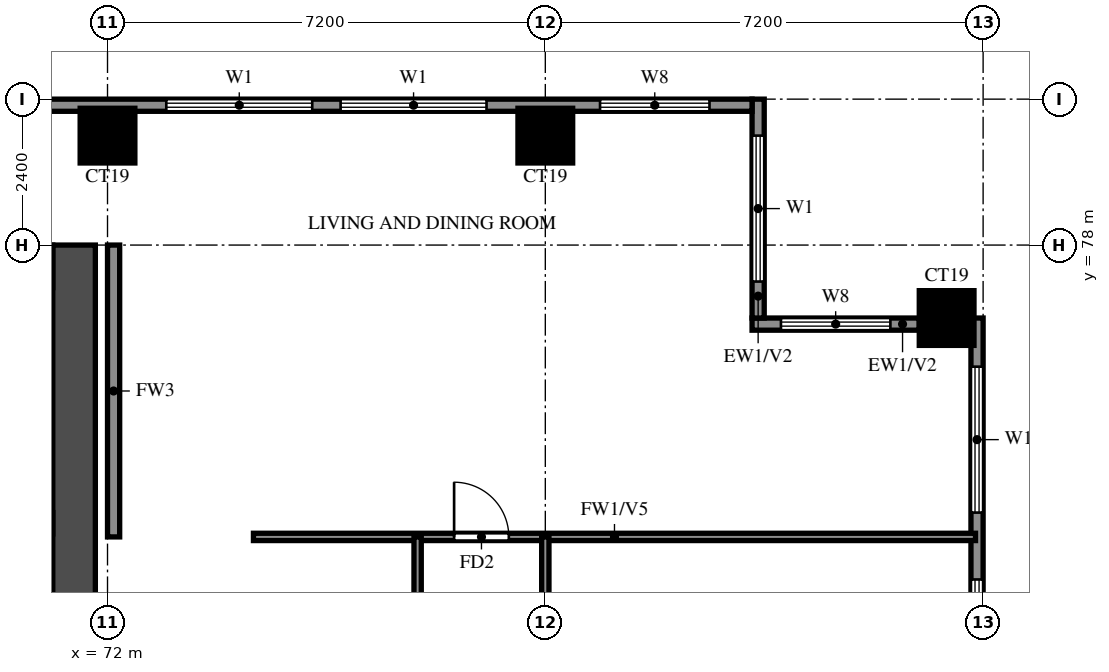
"""IFC4 building model, lengths in metres.
Left out: names, types, materials, properties, quantities, classifications, styles, units other than length and angle.
Written with IfcOpenShell. Run it as: python <this file> out.ifc"""

import sys

from ifc_helpers import new_model, si_unit, direction, frame, frame_2d, origin, origin_2d, place, context, subcontext, project, spatial, rectangle, extrude, source, transform, mapped, element, fill, save


model = new_model("IFC4")
c1 = context("Model", 3, precision=1e-05, world=origin(), true_north=direction((0.0, 1.0)))
c2 = subcontext(c1, "Body", "Model", "MODEL_VIEW")
j1 = project(units=[si_unit("LENGTHUNIT", "METRE"), si_unit("PLANEANGLEUNIT", "RADIAN")], contexts=[c1])
p1 = place(None, origin())
s1 = spatial("IfcSite", under=j1, at=p1, CompositionType="ELEMENT")
p2 = place(p1, origin())
s2 = spatial("IfcBuilding", under=s1, at=p2, CompositionType="ELEMENT")
p3 = place(p2, frame((0.0, 0.0, 130.5)))
s3 = spatial("IfcBuildingStorey", under=s2, at=p3, CompositionType="ELEMENT", Elevation=130.5)
m1 = source(origin(), c2, "Body", "SweptSolid", [
    extrude(rectangle(XDim=0.9, YDim=0.9, at=origin_2d()), origin(), (0.0, 0.0, 1.0), 3.2),
])
for number, where, z_axis, x_axis in (
    (1, (85.8, 76.8, 0.0), (0.0, 0.0, 1.0), (1.0, 0.0, 0.0)),
    (2, (72.0, 79.8, 0.0), (0.0, 0.0, 1.0), (1.0, 0.0, 0.0)),
    (3, (79.2, 79.8, 0.0), (0.0, 0.0, 1.0), (1.0, 0.0, 0.0)),
):
    element("IfcColumn", number, at=place(p3, frame(where, z_axis=z_axis, x_axis=x_axis)), inside=s3, PredefinedType="COLUMN", context=c2, shape_type="MappedRepresentation", body=[
        mapped(m1, transform((0.0, 0.0, 0.0))),
    ])
p4 = place(p3, frame((71.45, 66.1, 0.0), z_axis=(0.0, 0.0, 1.0), x_axis=(0.0, 1.0, 0.0)))
e4 = element("IfcWall", 4, at=p4, inside=s3, PredefinedType="SHEAR", context=c2, shape_type="SweptSolid", body=[
    extrude(rectangle(XDim=11.9, YDim=0.7, at=frame_2d((5.95, 0.0))), origin(), (0.0, 0.0, 1.0), 3.2),
])
p5 = place(p3, frame((29.7, 77.65, 0.0), z_axis=(0.0, 0.0, 1.0), x_axis=(1.0, 0.0, 0.0)))
e5 = element("IfcWall", 5, at=p5, inside=s3, PredefinedType="SHEAR", context=c2, shape_type="SweptSolid", body=[
    extrude(rectangle(XDim=41.4, YDim=0.7, at=frame_2d((20.7, 0.0))), origin(), (0.0, 0.0, 1.0), 3.2),
])
p6 = place(p3, frame((86.3, 48.2, 0.0), z_axis=(0.0, 0.0, 1.0), x_axis=(0.0, 1.0, 0.0)))
e6 = element("IfcWall", 6, at=p6, inside=s3, PredefinedType="SOLIDWALL", context=c2, shape_type="SweptSolid", body=[
    extrude(rectangle(XDim=28.6, YDim=0.2, at=frame_2d((14.3, 0.0))), origin(), (0.0, 0.0, 1.0), 3.2),
])
p7 = place(p6, frame((15.1, 0.0, 0.0)))
e7 = element("IfcOpeningElement", 7, at=p7, cuts=e6, PredefinedType="OPENING", context=c2, shape_type="SweptSolid", body=[
    extrude(rectangle(XDim=1.8, YDim=2.4, at=frame_2d((0.9, 1.2))), frame((0.0, 0.11, 0.0), z_axis=(0.0, -1.0, 0.0), x_axis=(1.0, 0.0, 0.0)), (0.0, 0.0, 1.0), 0.22),
])
p8 = place(p6, frame((0.6, 0.0, 0.6)))
e8 = element("IfcOpeningElement", 8, at=p8, cuts=e6, PredefinedType="OPENING", context=c2, shape_type="SweptSolid", body=[
    extrude(rectangle(XDim=2.4, YDim=2.4, at=frame_2d((1.2, 1.2))), frame((0.0, 0.11, 0.0), z_axis=(0.0, -1.0, 0.0), x_axis=(1.0, 0.0, 0.0)), (0.0, 0.0, 1.0), 0.22),
])
p9 = place(p6, frame((3.8, 0.0, 0.6)))
e9 = element("IfcOpeningElement", 9, at=p9, cuts=e6, PredefinedType="OPENING", context=c2, shape_type="SweptSolid", body=[
    extrude(rectangle(XDim=2.4, YDim=2.4, at=frame_2d((1.2, 1.2))), frame((0.0, 0.11, 0.0), z_axis=(0.0, -1.0, 0.0), x_axis=(1.0, 0.0, 0.0)), (0.0, 0.0, 1.0), 0.22),
])
p10 = place(p6, frame((7.8, 0.0, 0.6)))
e10 = element("IfcOpeningElement", 10, at=p10, cuts=e6, PredefinedType="OPENING", context=c2, shape_type="SweptSolid", body=[
    extrude(rectangle(XDim=2.4, YDim=2.4, at=frame_2d((1.2, 1.2))), frame((0.0, 0.11, 0.0), z_axis=(0.0, -1.0, 0.0), x_axis=(1.0, 0.0, 0.0)), (0.0, 0.0, 1.0), 0.22),
])
p11 = place(p6, frame((10.75, 0.0, 0.6)))
e11 = element("IfcOpeningElement", 11, at=p11, cuts=e6, PredefinedType="OPENING", context=c2, shape_type="SweptSolid", body=[
    extrude(rectangle(XDim=0.9, YDim=2.4, at=frame_2d((0.45, 1.2))), frame((0.0, 0.11, 0.0), z_axis=(0.0, -1.0, 0.0), x_axis=(1.0, 0.0, 0.0)), (0.0, 0.0, 1.0), 0.22),
])
p12 = place(p6, frame((12.5, 0.0, 0.6)))
e12 = element("IfcOpeningElement", 12, at=p12, cuts=e6, PredefinedType="OPENING", context=c2, shape_type="SweptSolid", body=[
    extrude(rectangle(XDim=1.2, YDim=2.4, at=frame_2d((0.6, 1.2))), frame((0.0, 0.11, 0.0), z_axis=(0.0, -1.0, 0.0), x_axis=(1.0, 0.0, 0.0)), (0.0, 0.0, 1.0), 0.22),
])
p13 = place(p6, frame((19.55, 0.0, 1.5)))
e13 = element("IfcOpeningElement", 13, at=p13, cuts=e6, PredefinedType="OPENING", context=c2, shape_type="SweptSolid", body=[
    extrude(rectangle(XDim=0.9, YDim=0.9, at=frame_2d((0.45, 0.45))), frame((0.0, 0.11, 0.0), z_axis=(0.0, -1.0, 0.0), x_axis=(1.0, 0.0, 0.0)), (0.0, 0.0, 1.0), 0.22),
])
p14 = place(p6, frame((22.5, 0.0, 0.6)))
e14 = element("IfcOpeningElement", 14, at=p14, cuts=e6, PredefinedType="OPENING", context=c2, shape_type="SweptSolid", body=[
    extrude(rectangle(XDim=1.8, YDim=2.4, at=frame_2d((0.9, 1.2))), frame((0.0, 0.11, 0.0), z_axis=(0.0, -1.0, 0.0), x_axis=(1.0, 0.0, 0.0)), (0.0, 0.0, 1.0), 0.22),
])
p15 = place(p6, frame((25.4, 0.0, 0.6)))
e15 = element("IfcOpeningElement", 15, at=p15, cuts=e6, PredefinedType="OPENING", context=c2, shape_type="SweptSolid", body=[
    extrude(rectangle(XDim=2.4, YDim=2.4, at=frame_2d((1.2, 1.2))), frame((0.0, 0.11, 0.0), z_axis=(0.0, -1.0, 0.0), x_axis=(1.0, 0.0, 0.0)), (0.0, 0.0, 1.0), 0.22),
])
p16 = place(p3, frame((85.35, 76.7, 0.0), z_axis=(0.0, 0.0, 1.0), x_axis=(-1.0, 0.0, 0.0)))
e16 = element("IfcWall", 16, at=p16, inside=s3, PredefinedType="SOLIDWALL", context=c2, shape_type="SweptSolid", body=[
    extrude(rectangle(XDim=2.75, YDim=0.2, at=frame_2d((1.375, 0.0))), origin(), (0.0, 0.0, 1.0), 3.2),
])
p17 = place(p16, frame((0.475, 0.0, 0.6)))
e17 = element("IfcOpeningElement", 17, at=p17, cuts=e16, PredefinedType="OPENING", context=c2, shape_type="SweptSolid", body=[
    extrude(rectangle(XDim=1.8, YDim=2.4, at=frame_2d((0.9, 1.2))), frame((0.0, 0.11, 0.0), z_axis=(0.0, -1.0, 0.0), x_axis=(1.0, 0.0, 0.0)), (0.0, 0.0, 1.0), 0.22),
])
p18 = place(p3, frame((82.7, 76.8, 0.0), z_axis=(0.0, 0.0, 1.0), x_axis=(0.0, 1.0, 0.0)))
e18 = element("IfcWall", 18, at=p18, inside=s3, PredefinedType="SOLIDWALL", context=c2, shape_type="SweptSolid", body=[
    extrude(rectangle(XDim=3.6, YDim=0.2, at=frame_2d((1.8, 0.0))), origin(), (0.0, 0.0, 1.0), 3.2),
])
p19 = place(p18, frame((0.6, 0.0, 0.6)))
e19 = element("IfcOpeningElement", 19, at=p19, cuts=e18, PredefinedType="OPENING", context=c2, shape_type="SweptSolid", body=[
    extrude(rectangle(XDim=2.4, YDim=2.4, at=frame_2d((1.2, 1.2))), frame((0.0, 0.11, 0.0), z_axis=(0.0, -1.0, 0.0), x_axis=(1.0, 0.0, 0.0)), (0.0, 0.0, 1.0), 0.22),
])
p20 = place(p3, frame((82.6, 80.3, 0.0), z_axis=(0.0, 0.0, 1.0), x_axis=(-1.0, 0.0, 0.0)))
e20 = element("IfcWall", 20, at=p20, inside=s3, PredefinedType="SOLIDWALL", context=c2, shape_type="SweptSolid", body=[
    extrude(rectangle(XDim=64.6, YDim=0.2, at=frame_2d((32.3, 0.0))), origin(), (0.0, 0.0, 1.0), 3.2),
])
p21 = place(p20, frame((58.3, 0.0, 0.0)))
e21 = element("IfcOpeningElement", 21, at=p21, cuts=e20, PredefinedType="OPENING", context=c2, shape_type="SweptSolid", body=[
    extrude(rectangle(XDim=1.8, YDim=2.4, at=frame_2d((0.9, 1.2))), frame((0.0, 0.11, 0.0), z_axis=(0.0, -1.0, 0.0), x_axis=(1.0, 0.0, 0.0)), (0.0, 0.0, 1.0), 0.22),
])
p22 = place(p20, frame((54.6, 0.0, 0.6)))
e22 = element("IfcOpeningElement", 22, at=p22, cuts=e20, PredefinedType="OPENING", context=c2, shape_type="SweptSolid", body=[
    extrude(rectangle(XDim=1.2, YDim=2.4, at=frame_2d((0.6, 1.2))), frame((0.0, 0.11, 0.0), z_axis=(0.0, -1.0, 0.0), x_axis=(1.0, 0.0, 0.0)), (0.0, 0.0, 1.0), 0.22),
])
p23 = place(p20, frame((56.95, 0.0, 0.6)))
e23 = element("IfcOpeningElement", 23, at=p23, cuts=e20, PredefinedType="OPENING", context=c2, shape_type="SweptSolid", body=[
    extrude(rectangle(XDim=0.9, YDim=2.4, at=frame_2d((0.45, 1.2))), frame((0.0, 0.11, 0.0), z_axis=(0.0, -1.0, 0.0), x_axis=(1.0, 0.0, 0.0)), (0.0, 0.0, 1.0), 0.22),
])
p24 = place(p20, frame((61.65, 0.0, 0.6)))
e24 = element("IfcOpeningElement", 24, at=p24, cuts=e20, PredefinedType="OPENING", context=c2, shape_type="SweptSolid", body=[
    extrude(rectangle(XDim=0.9, YDim=2.4, at=frame_2d((0.45, 1.2))), frame((0.0, 0.11, 0.0), z_axis=(0.0, -1.0, 0.0), x_axis=(1.0, 0.0, 0.0)), (0.0, 0.0, 1.0), 0.22),
])
p25 = place(p20, frame((0.7, 0.0, 0.6)))
e25 = element("IfcOpeningElement", 25, at=p25, cuts=e20, PredefinedType="OPENING", context=c2, shape_type="SweptSolid", body=[
    extrude(rectangle(XDim=1.8, YDim=2.4, at=frame_2d((0.9, 1.2))), frame((0.0, 0.11, 0.0), z_axis=(0.0, -1.0, 0.0), x_axis=(1.0, 0.0, 0.0)), (0.0, 0.0, 1.0), 0.22),
])
p26 = place(p20, frame((4.367, 0.0, 0.6)))
e26 = element("IfcOpeningElement", 26, at=p26, cuts=e20, PredefinedType="OPENING", context=c2, shape_type="SweptSolid", body=[
    extrude(rectangle(XDim=2.4, YDim=2.4, at=frame_2d((1.2, 1.2))), frame((0.0, 0.11, 0.0), z_axis=(0.0, -1.0, 0.0), x_axis=(1.0, 0.0, 0.0)), (0.0, 0.0, 1.0), 0.22),
])
p27 = place(p20, frame((7.233, 0.0, 0.6)))
e27 = element("IfcOpeningElement", 27, at=p27, cuts=e20, PredefinedType="OPENING", context=c2, shape_type="SweptSolid", body=[
    extrude(rectangle(XDim=2.4, YDim=2.4, at=frame_2d((1.2, 1.2))), frame((0.0, 0.11, 0.0), z_axis=(0.0, -1.0, 0.0), x_axis=(1.0, 0.0, 0.0)), (0.0, 0.0, 1.0), 0.22),
])
p28 = place(p3, frame((72.1, 73.2, 0.0), z_axis=(0.0, 0.0, 1.0), x_axis=(0.0, 1.0, 0.0)))
e28 = element("IfcWall", 28, at=p28, inside=s3, PredefinedType="SOLIDWALL", context=c2, shape_type="SweptSolid", body=[
    extrude(rectangle(XDim=4.8, YDim=0.2, at=frame_2d((2.4, 0.0))), origin(), (0.0, 0.0, 1.0), 3.2),
])
p29 = place(p3, frame((74.4, 73.2, 0.0), z_axis=(0.0, 0.0, 1.0), x_axis=(1.0, 0.0, 0.0)))
e29 = element("IfcWall", 29, at=p29, inside=s3, PredefinedType="PARTITIONING", context=c2, shape_type="SweptSolid", body=[
    extrude(rectangle(XDim=11.875, YDim=0.12, at=frame_2d((5.938, 0.0))), origin(), (0.0, 0.0, 1.0), 2.3),
])
p30 = place(p29, frame((3.3, 0.0, 0.0)))
e30 = element("IfcOpeningElement", 30, at=p30, cuts=e29, PredefinedType="OPENING", context=c2, shape_type="SweptSolid", body=[
    extrude(rectangle(XDim=0.9, YDim=2.1, at=frame_2d((0.45, 1.05))), frame((0.0, 0.07, 0.0), z_axis=(0.0, -1.0, 0.0), x_axis=(1.0, 0.0, 0.0)), (0.0, 0.0, 1.0), 0.14),
])
p31 = place(p3, frame((77.1, 64.8, 0.0), z_axis=(0.0, 0.0, 1.0), x_axis=(0.0, 1.0, 0.0)))
e31 = element("IfcWall", 31, at=p31, inside=s3, PredefinedType="PARTITIONING", context=c2, shape_type="SweptSolid", body=[
    extrude(rectangle(XDim=8.4, YDim=0.12, at=frame_2d((4.2, 0.0))), origin(), (0.0, 0.0, 1.0), 3.2),
])
p32 = place(p31, frame((1.875, 0.0, 0.0)))
e32 = element("IfcOpeningElement", 32, at=p32, cuts=e31, PredefinedType="OPENING", context=c2, shape_type="SweptSolid", body=[
    extrude(rectangle(XDim=0.9, YDim=2.1, at=frame_2d((0.45, 1.05))), frame((0.0, 0.07, 0.0), z_axis=(0.0, -1.0, 0.0), x_axis=(1.0, 0.0, 0.0)), (0.0, 0.0, 1.0), 0.14),
])
p33 = place(p31, frame((6.075, 0.0, 0.0)))
e33 = element("IfcOpeningElement", 33, at=p33, cuts=e31, PredefinedType="OPENING", context=c2, shape_type="SweptSolid", body=[
    extrude(rectangle(XDim=0.9, YDim=2.1, at=frame_2d((0.45, 1.05))), frame((0.0, 0.07, 0.0), z_axis=(0.0, -1.0, 0.0), x_axis=(1.0, 0.0, 0.0)), (0.0, 0.0, 1.0), 0.14),
])
p34 = place(p3, frame((79.2, 69.6, 0.0), z_axis=(0.0, 0.0, 1.0), x_axis=(0.0, 1.0, 0.0)))
e34 = element("IfcWall", 34, at=p34, inside=s3, PredefinedType="PARTITIONING", context=c2, shape_type="SweptSolid", body=[
    extrude(rectangle(XDim=3.6, YDim=0.12, at=frame_2d((1.8, 0.0))), origin(), (0.0, 0.0, 1.0), 3.2),
])
p35 = place(p34, frame((1.35, 0.0, 0.0)))
e35 = element("IfcOpeningElement", 35, at=p35, cuts=e34, PredefinedType="OPENING", context=c2, shape_type="SweptSolid", body=[
    extrude(rectangle(XDim=0.9, YDim=2.1, at=frame_2d((0.45, 1.05))), frame((0.0, 0.07, 0.0), z_axis=(0.0, -1.0, 0.0), x_axis=(1.0, 0.0, 0.0)), (0.0, 0.0, 1.0), 0.14),
])
p36 = place(p14, origin())
e36 = element("IfcWindow", 36, at=p36, inside=s3, PartitioningType="DOUBLE_PANEL_VERTICAL", PredefinedType="WINDOW", context=c2, shape_type="SweptSolid", body=[
    extrude(rectangle(XDim=1.8, YDim=2.4, at=frame_2d((0.9, 1.2))), frame((0.0, 0.03, 0.0), z_axis=(0.0, -1.0, 0.0), x_axis=(1.0, 0.0, 0.0)), (0.0, 0.0, 1.0), 0.06),
])
fill(e14, e36)
p37 = place(p15, origin())
e37 = element("IfcWindow", 37, at=p37, inside=s3, PartitioningType="DOUBLE_PANEL_VERTICAL", PredefinedType="WINDOW", context=c2, shape_type="SweptSolid", body=[
    extrude(rectangle(XDim=2.4, YDim=2.4, at=frame_2d((1.2, 1.2))), frame((0.0, 0.03, 0.0), z_axis=(0.0, -1.0, 0.0), x_axis=(1.0, 0.0, 0.0)), (0.0, 0.0, 1.0), 0.06),
])
fill(e15, e37)
p38 = place(p17, origin())
e38 = element("IfcWindow", 38, at=p38, inside=s3, PartitioningType="DOUBLE_PANEL_VERTICAL", PredefinedType="WINDOW", context=c2, shape_type="SweptSolid", body=[
    extrude(rectangle(XDim=1.8, YDim=2.4, at=frame_2d((0.9, 1.2))), frame((0.0, 0.03, 0.0), z_axis=(0.0, -1.0, 0.0), x_axis=(1.0, 0.0, 0.0)), (0.0, 0.0, 1.0), 0.06),
])
fill(e17, e38)
p39 = place(p19, origin())
e39 = element("IfcWindow", 39, at=p39, inside=s3, PartitioningType="DOUBLE_PANEL_VERTICAL", PredefinedType="WINDOW", context=c2, shape_type="SweptSolid", body=[
    extrude(rectangle(XDim=2.4, YDim=2.4, at=frame_2d((1.2, 1.2))), frame((0.0, 0.03, 0.0), z_axis=(0.0, -1.0, 0.0), x_axis=(1.0, 0.0, 0.0)), (0.0, 0.0, 1.0), 0.06),
])
fill(e19, e39)
p40 = place(p25, origin())
e40 = element("IfcWindow", 40, at=p40, inside=s3, PartitioningType="DOUBLE_PANEL_VERTICAL", PredefinedType="WINDOW", context=c2, shape_type="SweptSolid", body=[
    extrude(rectangle(XDim=1.8, YDim=2.4, at=frame_2d((0.9, 1.2))), frame((0.0, 0.03, 0.0), z_axis=(0.0, -1.0, 0.0), x_axis=(1.0, 0.0, 0.0)), (0.0, 0.0, 1.0), 0.06),
])
fill(e25, e40)
p41 = place(p26, origin())
e41 = element("IfcWindow", 41, at=p41, inside=s3, PartitioningType="DOUBLE_PANEL_VERTICAL", PredefinedType="WINDOW", context=c2, shape_type="SweptSolid", body=[
    extrude(rectangle(XDim=2.4, YDim=2.4, at=frame_2d((1.2, 1.2))), frame((0.0, 0.03, 0.0), z_axis=(0.0, -1.0, 0.0), x_axis=(1.0, 0.0, 0.0)), (0.0, 0.0, 1.0), 0.06),
])
fill(e26, e41)
p42 = place(p27, origin())
e42 = element("IfcWindow", 42, at=p42, inside=s3, PartitioningType="DOUBLE_PANEL_VERTICAL", PredefinedType="WINDOW", context=c2, shape_type="SweptSolid", body=[
    extrude(rectangle(XDim=2.4, YDim=2.4, at=frame_2d((1.2, 1.2))), frame((0.0, 0.03, 0.0), z_axis=(0.0, -1.0, 0.0), x_axis=(1.0, 0.0, 0.0)), (0.0, 0.0, 1.0), 0.06),
])
fill(e27, e42)
p43 = place(p30, origin())
e43 = element("IfcDoor", 43, at=p43, inside=s3, OperationType="SINGLE_SWING_RIGHT", PredefinedType="DOOR", context=c2, shape_type="SweptSolid", body=[
    extrude(rectangle(XDim=0.9, YDim=2.1, at=frame_2d((0.45, 1.05))), frame((0.0, 0.025, 0.0), z_axis=(0.0, -1.0, 0.0), x_axis=(1.0, 0.0, 0.0)), (0.0, 0.0, 1.0), 0.05),
])
fill(e30, e43)
save(model, sys.argv[1])
